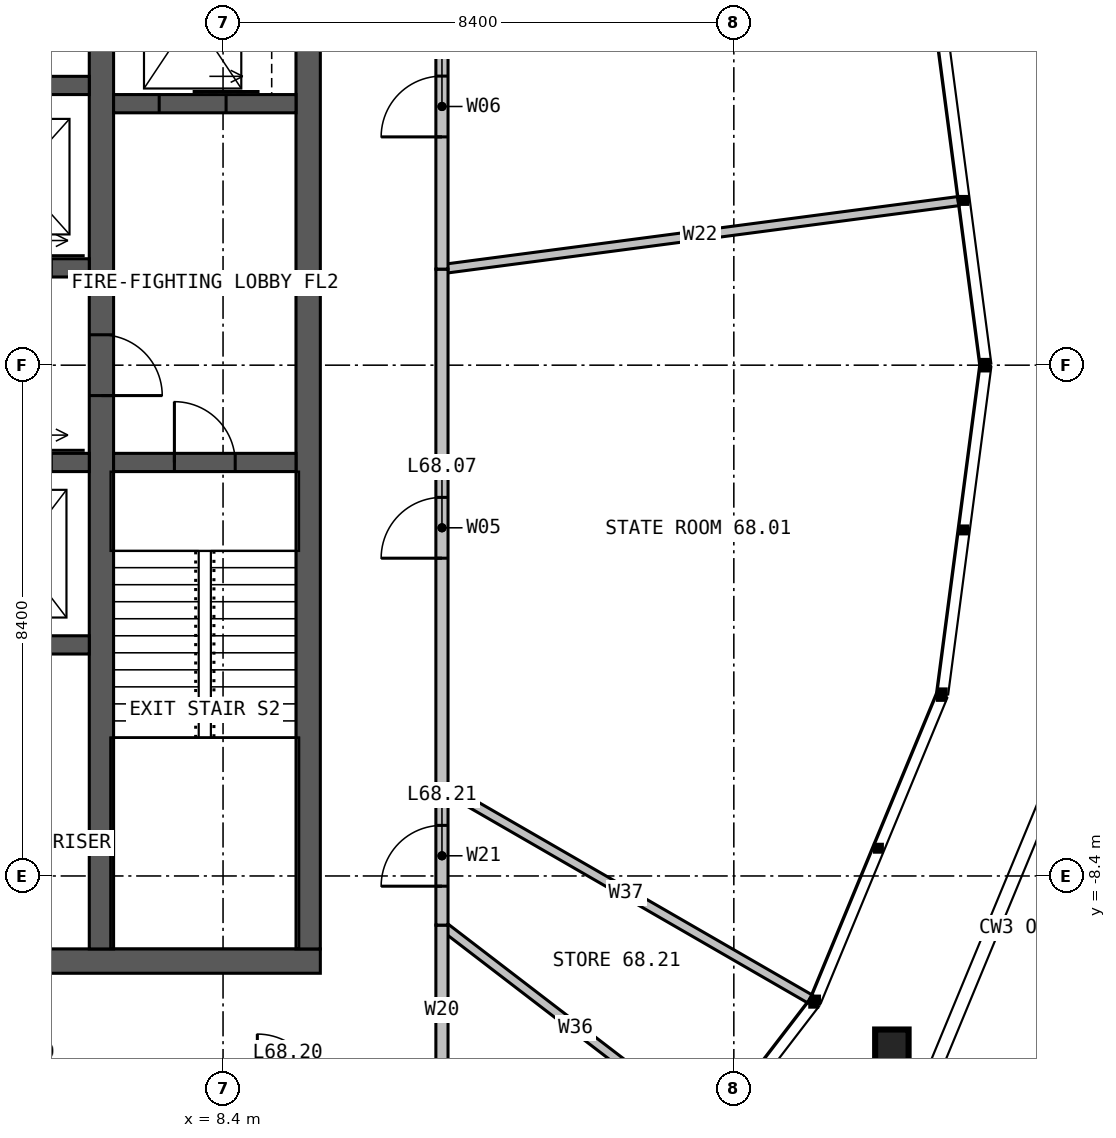
"""IFC4 building model, lengths in metres.
Left out: names, types, materials, properties, quantities, classifications, styles, units other than length and angle.
Written with IfcOpenShell. Run it as: python <this file> out.ifc"""

import sys

from ifc_helpers import new_model, si_unit, direction, frame, frame_2d, origin, origin_2d, place, context, subcontext, project, spatial, rectangle, hollow_rectangle, extrude, element, fill, save


model = new_model("IFC4")
c1 = context("Model", 3, precision=1e-05, world=origin(), true_north=direction((0.0, 1.0)))
c2 = subcontext(c1, "Body", "Model", "MODEL_VIEW")
j1 = project(units=[si_unit("LENGTHUNIT", "METRE"), si_unit("PLANEANGLEUNIT", "RADIAN")], contexts=[c1])
p1 = place(None, origin())
s1 = spatial("IfcSite", under=j1, at=p1, CompositionType="ELEMENT")
p2 = place(p1, origin())
s2 = spatial("IfcBuilding", under=s1, at=p2, CompositionType="ELEMENT")
p3 = place(p2, frame((0.0, 0.0, 280.0)))
s3 = spatial("IfcBuildingStorey", under=s2, at=p3, CompositionType="ELEMENT", Elevation=280.0)
p4 = place(p3, frame((10.0, -9.8, 0.0), z_axis=(0.0, 0.0, 1.0), x_axis=(-1.0, 0.0, 0.0)))
e1 = element("IfcWall", 1, at=p4, inside=s3, PredefinedType="SOLIDWALL", context=c2, shape_type="SweptSolid", body=[
    extrude(rectangle(XDim=20.0, YDim=0.4, at=frame_2d((10.0, 0.0))), origin(), (0.0, 0.0, 1.0), 4.0),
])
p5 = place(p4, frame((6.875, 0.0, 0.0)))
e2 = element("IfcOpeningElement", 2, at=p5, cuts=e1, PredefinedType="OPENING", context=c2, shape_type="SweptSolid", body=[
    extrude(rectangle(XDim=1.2, YDim=2.2, at=frame_2d((0.6, 1.1))), frame((0.0, 0.21, 0.0), z_axis=(0.0, -1.0, 0.0), x_axis=(1.0, 0.0, 0.0)), (0.0, 0.0, 1.0), 0.42),
])
p6 = place(p3, frame((9.8, -9.6, 0.0), z_axis=(0.0, 0.0, 1.0), x_axis=(0.0, 1.0, 0.0)))
e3 = element("IfcWall", 3, at=p6, inside=s3, PredefinedType="SOLIDWALL", context=c2, shape_type="SweptSolid", body=[
    extrude(rectangle(XDim=19.2, YDim=0.4, at=frame_2d((9.6, 0.0))), origin(), (0.0, 0.0, 1.0), 4.0),
])
p7 = place(p3, frame((6.4, 9.6, 0.0), z_axis=(0.0, 0.0, 1.0), x_axis=(0.0, -1.0, 0.0)))
e4 = element("IfcWall", 4, at=p7, inside=s3, PredefinedType="SOLIDWALL", context=c2, shape_type="SweptSolid", body=[
    extrude(rectangle(XDim=19.2, YDim=0.4, at=frame_2d((9.6, 0.0))), origin(), (0.0, 0.0, 1.0), 4.0),
])
p8 = place(p7, frame((9.1, 0.0, 0.0)))
e5 = element("IfcOpeningElement", 5, at=p8, cuts=e4, PredefinedType="OPENING", context=c2, shape_type="SweptSolid", body=[
    extrude(rectangle(XDim=1.0, YDim=2.2, at=frame_2d((0.5, 1.1))), frame((0.0, 0.21, 0.0), z_axis=(0.0, -1.0, 0.0), x_axis=(1.0, 0.0, 0.0)), (0.0, 0.0, 1.0), 0.42),
])
p9 = place(p3, frame((1.35, 1.6, 0.0), z_axis=(0.0, 0.0, 1.0), x_axis=(1.0, 0.0, 0.0)))
e6 = element("IfcWall", 6, at=p9, inside=s3, PredefinedType="SOLIDWALL", context=c2, shape_type="SweptSolid", body=[
    extrude(rectangle(XDim=4.85, YDim=0.3, at=frame_2d((2.425, 0.0))), origin(), (0.0, 0.0, 1.0), 4.0),
])
p10 = place(p9, frame((0.6, 0.0, 0.0)))
e7 = element("IfcOpeningElement", 7, at=p10, cuts=e6, PredefinedType="OPENING", context=c2, shape_type="SweptSolid", body=[
    extrude(rectangle(XDim=1.1, YDim=2.2, at=frame_2d((0.55, 1.1))), frame((0.0, 0.16, 0.0), z_axis=(0.0, -1.0, 0.0), x_axis=(1.0, 0.0, 0.0)), (0.0, 0.0, 1.0), 0.32),
])
p11 = place(p9, frame((3.125, 0.0, 0.0)))
e8 = element("IfcOpeningElement", 8, at=p11, cuts=e6, PredefinedType="OPENING", context=c2, shape_type="SweptSolid", body=[
    extrude(rectangle(XDim=1.1, YDim=2.2, at=frame_2d((0.55, 1.1))), frame((0.0, 0.16, 0.0), z_axis=(0.0, -1.0, 0.0), x_axis=(1.0, 0.0, 0.0)), (0.0, 0.0, 1.0), 0.32),
])
p12 = place(p3, frame((1.35, 4.6, 0.0), z_axis=(0.0, 0.0, 1.0), x_axis=(1.0, 0.0, 0.0)))
e9 = element("IfcWall", 9, at=p12, inside=s3, PredefinedType="SOLIDWALL", context=c2, shape_type="SweptSolid", body=[
    extrude(rectangle(XDim=4.85, YDim=0.3, at=frame_2d((2.425, 0.0))), origin(), (0.0, 0.0, 1.0), 4.0),
])
p13 = place(p3, frame((3.85, -1.6, 0.0), z_axis=(0.0, 0.0, 1.0), x_axis=(1.0, 0.0, 0.0)))
e10 = element("IfcWall", 10, at=p13, inside=s3, PredefinedType="SOLIDWALL", context=c2, shape_type="SweptSolid", body=[
    extrude(rectangle(XDim=2.35, YDim=0.3, at=frame_2d((1.175, 0.0))), origin(), (0.0, 0.0, 1.0), 4.0),
])
p14 = place(p13, frame((0.625, 0.0, 0.0)))
e11 = element("IfcOpeningElement", 11, at=p14, cuts=e10, PredefinedType="OPENING", context=c2, shape_type="SweptSolid", body=[
    extrude(rectangle(XDim=1.1, YDim=2.2, at=frame_2d((0.55, 1.1))), frame((0.0, 0.16, 0.0), z_axis=(0.0, -1.0, 0.0), x_axis=(1.0, 0.0, 0.0)), (0.0, 0.0, 1.0), 0.32),
])
p15 = place(p3, frame((3.85, -4.6, 0.0), z_axis=(0.0, 0.0, 1.0), x_axis=(1.0, 0.0, 0.0)))
e12 = element("IfcWall", 12, at=p15, inside=s3, PredefinedType="SOLIDWALL", context=c2, shape_type="SweptSolid", body=[
    extrude(rectangle(XDim=2.35, YDim=0.3, at=frame_2d((1.175, 0.0))), origin(), (0.0, 0.0, 1.0), 4.0),
])
p16 = place(p3, frame((6.6, -1.6, 0.0), z_axis=(0.0, 0.0, 1.0), x_axis=(1.0, 0.0, 0.0)))
e13 = element("IfcWall", 13, at=p16, inside=s3, PredefinedType="SOLIDWALL", context=c2, shape_type="SweptSolid", body=[
    extrude(rectangle(XDim=3.0, YDim=0.3, at=frame_2d((1.5, 0.0))), origin(), (0.0, 0.0, 1.0), 4.0),
])
p17 = place(p16, frame((1.0, 0.0, 0.0)))
e14 = element("IfcOpeningElement", 14, at=p17, cuts=e13, PredefinedType="OPENING", context=c2, shape_type="SweptSolid", body=[
    extrude(rectangle(XDim=1.0, YDim=2.2, at=frame_2d((0.5, 1.1))), frame((0.0, 0.16, 0.0), z_axis=(0.0, -1.0, 0.0), x_axis=(1.0, 0.0, 0.0)), (0.0, 0.0, 1.0), 0.32),
])
p18 = place(p3, frame((6.6, 4.3, 0.0), z_axis=(0.0, 0.0, 1.0), x_axis=(1.0, 0.0, 0.0)))
e15 = element("IfcWall", 15, at=p18, inside=s3, PredefinedType="SOLIDWALL", context=c2, shape_type="SweptSolid", body=[
    extrude(rectangle(XDim=3.0, YDim=0.3, at=frame_2d((1.5, 0.0))), origin(), (0.0, 0.0, 1.0), 4.0),
])
p19 = place(p18, frame((0.75, 0.0, 0.0)))
e16 = element("IfcOpeningElement", 16, at=p19, cuts=e15, PredefinedType="OPENING", context=c2, shape_type="SweptSolid", body=[
    extrude(rectangle(XDim=1.1, YDim=2.2, at=frame_2d((0.55, 1.1))), frame((0.0, 0.16, 0.0), z_axis=(0.0, -1.0, 0.0), x_axis=(1.0, 0.0, 0.0)), (0.0, 0.0, 1.0), 0.32),
])
p20 = place(p3, frame((19.399, -11.2, -0.71), z_axis=(0.0, 0.0, 1.0), x_axis=(1.0, 0.0, 0.0)))
e17 = element("IfcColumn", 17, at=p20, inside=s3, PredefinedType="COLUMN", context=c2, shape_type="SweptSolid", body=[
    extrude(hollow_rectangle(XDim=0.55, YDim=0.55, WallThickness=0.04, at=origin_2d()), origin(), (0.0, 0.0, 1.0), 4.0),
])
p21 = place(p3, frame((12.0, -6.928, 0.0), z_axis=(0.0, 0.0, 1.0), x_axis=(0.866031452229, -0.49998952364, 0.0)))
e18 = element("IfcWall", 18, at=p21, inside=s3, PredefinedType="PARTITIONING", context=c2, shape_type="SweptSolid", body=[
    extrude(rectangle(XDim=6.99, YDim=0.15, at=frame_2d((3.495, 0.0))), origin(), (0.0, 0.0, 1.0), 2.7),
])
p22 = place(p3, frame((12.0, 1.58, 0.0), z_axis=(0.0, 0.0, 1.0), x_axis=(0.991443910355, 0.130533415725, 0.0)))
e19 = element("IfcWall", 19, at=p22, inside=s3, PredefinedType="PARTITIONING", context=c2, shape_type="SweptSolid", body=[
    extrude(rectangle(XDim=8.564, YDim=0.15, at=frame_2d((4.282, 0.0))), origin(), (0.0, 0.0, 1.0), 2.79),
])
p23 = place(p3, frame((12.0, -9.208, 0.0), z_axis=(0.0, 0.0, 1.0), x_axis=(0.793365234103, -0.608745928377, 0.0)))
e20 = element("IfcWall", 20, at=p23, inside=s3, PredefinedType="PARTITIONING", context=c2, shape_type="SweptSolid", body=[
    extrude(rectangle(XDim=5.542, YDim=0.15, at=frame_2d((2.771, 0.0))), origin(), (0.0, 0.0, 1.0), 2.79),
])
p24 = place(p3, frame((12.0, -6.928, 0.0), z_axis=(0.0, 0.0, 1.0), x_axis=(0.0, 1.0, 0.0)))
e21 = element("IfcWall", 21, at=p24, inside=s3, PredefinedType="PARTITIONING", context=c2, shape_type="SweptSolid", body=[
    extrude(rectangle(XDim=8.508, YDim=0.2, at=frame_2d((4.254, 0.0))), origin(), (0.0, 0.0, 1.0), 3.7),
])
p25 = place(p24, frame((3.754, 0.0, 0.0)))
e22 = element("IfcOpeningElement", 22, at=p25, cuts=e21, PredefinedType="OPENING", context=c2, shape_type="SweptSolid", body=[
    extrude(rectangle(XDim=1.0, YDim=2.2, at=frame_2d((0.5, 1.1))), frame((0.0, 0.11, 0.0), z_axis=(0.0, -1.0, 0.0), x_axis=(1.0, 0.0, 0.0)), (0.0, 0.0, 1.0), 0.22),
])
p26 = place(p3, frame((12.0, 1.58, 0.0), z_axis=(0.0, 0.0, 1.0), x_axis=(0.0, 1.0, 0.0)))
e23 = element("IfcWall", 23, at=p26, inside=s3, PredefinedType="PARTITIONING", context=c2, shape_type="SweptSolid", body=[
    extrude(rectangle(XDim=5.348, YDim=0.2, at=frame_2d((2.674, 0.0))), origin(), (0.0, 0.0, 1.0), 3.7),
])
p27 = place(p26, frame((2.174, 0.0, 0.0)))
e24 = element("IfcOpeningElement", 24, at=p27, cuts=e23, PredefinedType="OPENING", context=c2, shape_type="SweptSolid", body=[
    extrude(rectangle(XDim=1.0, YDim=2.2, at=frame_2d((0.5, 1.1))), frame((0.0, 0.11, 0.0), z_axis=(0.0, -1.0, 0.0), x_axis=(1.0, 0.0, 0.0)), (0.0, 0.0, 1.0), 0.22),
])
p28 = place(p3, frame((12.0, -12.0, 0.0), z_axis=(0.0, 0.0, 1.0), x_axis=(0.0, 1.0, 0.0)))
e25 = element("IfcWall", 25, at=p28, inside=s3, PredefinedType="PARTITIONING", context=c2, shape_type="SweptSolid", body=[
    extrude(rectangle(XDim=2.792, YDim=0.2, at=frame_2d((1.396, 0.0))), origin(), (0.0, 0.0, 1.0), 3.7),
])
p29 = place(p3, frame((12.0, -9.208, 0.0), z_axis=(0.0, 0.0, 1.0), x_axis=(0.0, 1.0, 0.0)))
e26 = element("IfcWall", 26, at=p29, inside=s3, PredefinedType="PARTITIONING", context=c2, shape_type="SweptSolid", body=[
    extrude(rectangle(XDim=2.28, YDim=0.2, at=frame_2d((1.14, 0.0))), origin(), (0.0, 0.0, 1.0), 3.7),
])
p30 = place(p29, frame((0.64, 0.0, 0.0)))
e27 = element("IfcOpeningElement", 27, at=p30, cuts=e26, PredefinedType="OPENING", context=c2, shape_type="SweptSolid", body=[
    extrude(rectangle(XDim=1.0, YDim=2.2, at=frame_2d((0.5, 1.1))), frame((0.0, 0.11, 0.0), z_axis=(0.0, -1.0, 0.0), x_axis=(1.0, 0.0, 0.0)), (0.0, 0.0, 1.0), 0.22),
])
p31 = place(p8, origin())
e28 = element("IfcDoor", 28, at=p31, inside=s3, OperationType="SINGLE_SWING_RIGHT", PredefinedType="DOOR", context=c2, shape_type="SweptSolid", body=[
    extrude(rectangle(XDim=1.0, YDim=2.2, at=frame_2d((0.5, 1.1))), frame((0.0, 0.025, 0.0), z_axis=(0.0, -1.0, 0.0), x_axis=(1.0, 0.0, 0.0)), (0.0, 0.0, 1.0), 0.05),
])
fill(e5, e28)
p32 = place(p17, origin())
e29 = element("IfcDoor", 29, at=p32, inside=s3, OperationType="SINGLE_SWING_LEFT", PredefinedType="DOOR", context=c2, shape_type="SweptSolid", body=[
    extrude(rectangle(XDim=1.0, YDim=2.2, at=frame_2d((0.5, 1.1))), frame((0.0, 0.025, 0.0), z_axis=(0.0, -1.0, 0.0), x_axis=(1.0, 0.0, 0.0)), (0.0, 0.0, 1.0), 0.05),
])
fill(e14, e29)
p33 = place(p19, origin())
e30 = element("IfcDoor", 30, at=p33, inside=s3, OperationType="SLIDING_TO_LEFT", PredefinedType="DOOR", context=c2, shape_type="SweptSolid", body=[
    extrude(rectangle(XDim=1.1, YDim=2.2, at=frame_2d((0.55, 1.1))), frame((0.0, 0.025, 0.0), z_axis=(0.0, -1.0, 0.0), x_axis=(1.0, 0.0, 0.0)), (0.0, 0.0, 1.0), 0.05),
])
fill(e16, e30)
p34 = place(p25, origin())
e31 = element("IfcDoor", 31, at=p34, inside=s3, OperationType="SINGLE_SWING_LEFT", PredefinedType="DOOR", context=c2, shape_type="SweptSolid", body=[
    extrude(rectangle(XDim=1.0, YDim=2.2, at=frame_2d((0.5, 1.1))), frame((0.0, 0.025, 0.0), z_axis=(0.0, -1.0, 0.0), x_axis=(1.0, 0.0, 0.0)), (0.0, 0.0, 1.0), 0.05),
])
fill(e22, e31)
p35 = place(p27, origin())
e32 = element("IfcDoor", 32, at=p35, inside=s3, OperationType="SINGLE_SWING_LEFT", PredefinedType="DOOR", context=c2, shape_type="SweptSolid", body=[
    extrude(rectangle(XDim=1.0, YDim=2.2, at=frame_2d((0.5, 1.1))), frame((0.0, 0.025, 0.0), z_axis=(0.0, -1.0, 0.0), x_axis=(1.0, 0.0, 0.0)), (0.0, 0.0, 1.0), 0.05),
])
fill(e24, e32)
p36 = place(p30, origin())
e33 = element("IfcDoor", 33, at=p36, inside=s3, OperationType="SINGLE_SWING_LEFT", PredefinedType="DOOR", context=c2, shape_type="SweptSolid", body=[
    extrude(rectangle(XDim=1.0, YDim=2.2, at=frame_2d((0.5, 1.1))), frame((0.0, 0.025, 0.0), z_axis=(0.0, -1.0, 0.0), x_axis=(1.0, 0.0, 0.0)), (0.0, 0.0, 1.0), 0.05),
])
fill(e27, e33)
save(model, sys.argv[1])
